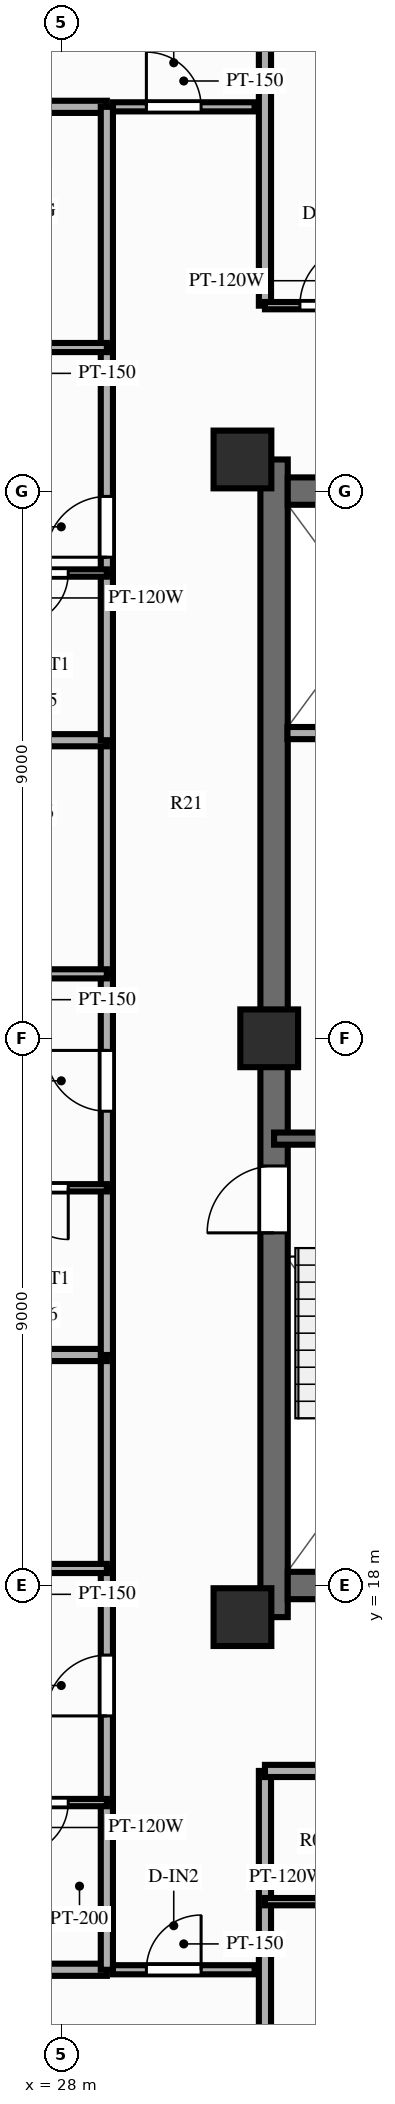
"""IFC4 building model, lengths in metres.
Left out: names, types, materials, properties, quantities, classifications, styles, units other than length and angle.
Written with IfcOpenShell. Run it as: python <this file> out.ifc"""

import sys

from ifc_helpers import new_model, si_unit, direction, frame, frame_2d, origin, origin_2d, place, context, subcontext, project, spatial, rectangle, extrude, source, transform, mapped, element, fill, save


model = new_model("IFC4")
c1 = context("Model", 3, precision=1e-05, world=origin(), true_north=direction((0.0, 1.0)))
c2 = subcontext(c1, "Body", "Model", "MODEL_VIEW")
j1 = project(units=[si_unit("LENGTHUNIT", "METRE"), si_unit("PLANEANGLEUNIT", "RADIAN")], contexts=[c1])
p1 = place(None, origin())
s1 = spatial("IfcSite", under=j1, at=p1, CompositionType="ELEMENT")
p2 = place(p1, origin())
s2 = spatial("IfcBuilding", under=s1, at=p2, CompositionType="ELEMENT")
p3 = place(p2, frame((0.0, 0.0, 226.2)))
s3 = spatial("IfcBuildingStorey", under=s2, at=p3, CompositionType="ELEMENT", Elevation=226.2)
p4 = place(p3, frame((31.5, 17.48, 0.0), z_axis=(0.0, 0.0, 1.0), x_axis=(0.0, 1.0, 0.0)))
e1 = element("IfcWall", 1, at=p4, inside=s3, PredefinedType="SHEAR", context=c2, shape_type="SweptSolid", body=[
    extrude(rectangle(XDim=19.04, YDim=0.45, at=frame_2d((9.52, 0.0))), origin(), (0.0, 0.0, 1.0), 3.9),
])
p5 = place(p4, frame((6.32, 0.0, 0.0)))
e2 = element("IfcOpeningElement", 2, at=p5, cuts=e1, PredefinedType="OPENING", context=c2, shape_type="SweptSolid", body=[
    extrude(rectangle(XDim=1.1, YDim=2.15, at=frame_2d((0.55, 1.075))), frame((0.0, 0.237, 0.0), z_axis=(0.0, -1.0, 0.0), x_axis=(1.0, 0.0, 0.0)), (0.0, 0.0, 1.0), 0.474),
])
p6 = place(p3, frame((31.725, 18.0, 0.0), z_axis=(0.0, 0.0, 1.0), x_axis=(1.0, 0.0, 0.0)))
e3 = element("IfcWall", 3, at=p6, inside=s3, PredefinedType="SHEAR", context=c2, shape_type="SweptSolid", body=[
    extrude(rectangle(XDim=12.55, YDim=0.45, at=frame_2d((6.275, 0.0))), origin(), (0.0, 0.0, 1.0), 3.9),
])
p7 = place(p3, frame((31.725, 36.0, 0.0), z_axis=(0.0, 0.0, 1.0), x_axis=(1.0, 0.0, 0.0)))
e4 = element("IfcWall", 4, at=p7, inside=s3, PredefinedType="SHEAR", context=c2, shape_type="SweptSolid", body=[
    extrude(rectangle(XDim=12.55, YDim=0.45, at=frame_2d((6.275, 0.0))), origin(), (0.0, 0.0, 1.0), 3.9),
])
p8 = place(p7, frame((5.225, 0.0, 0.0), z_axis=(0.0, 0.0, 1.0), x_axis=(-1.0, 0.0, 0.0)))
e5 = element("IfcOpeningElement", 5, at=p8, cuts=e4, PredefinedType="OPENING", context=c2, shape_type="SweptSolid", body=[
    extrude(rectangle(XDim=1.4, YDim=2.15, at=frame_2d((0.7, 1.075))), frame((0.0, 0.237, 0.0), z_axis=(0.0, -1.0, 0.0), x_axis=(1.0, 0.0, 0.0)), (0.0, 0.0, 1.0), 0.474),
])
m1 = source(origin(), c2, "Body", "SweptSolid", [
    extrude(rectangle(XDim=0.95, YDim=0.95, at=origin_2d()), origin(), (0.0, 0.0, 1.0), 3.9),
])
for number, where, z_axis, x_axis in (
    (6, (30.98, 17.48, 0.0), (0.0, 0.0, 1.0), (1.0, 0.0, 0.0)),
    (7, (30.98, 36.52, 0.0), (0.0, 0.0, 1.0), (1.0, 0.0, 0.0)),
    (8, (31.42, 27.0, 0.0), (0.0, 0.0, 1.0), (1.0, 0.0, 0.0)),
):
    element("IfcColumn", number, at=place(p3, frame(where, z_axis=z_axis, x_axis=x_axis)), inside=s3, PredefinedType="COLUMN", context=c2, shape_type="MappedRepresentation", body=[
        mapped(m1, transform((0.0, 0.0, 0.0), scale=1.0)),
    ])
p9 = place(p3, frame((31.5, 25.35, 0.0), z_axis=(0.0, 0.0, 1.0), x_axis=(1.0, 0.0, 0.0)))
e9 = element("IfcWall", 9, at=p9, inside=s3, PredefinedType="SOLIDWALL", context=c2, shape_type="SweptSolid", body=[
    extrude(rectangle(XDim=3.93, YDim=0.2, at=frame_2d((1.965, 0.0))), origin(), (0.0, 0.0, 1.0), 3.69),
])
p10 = place(p3, frame((31.72, 32.02, 0.0), z_axis=(0.0, 0.0, 1.0), x_axis=(1.0, 0.0, 0.0)))
e10 = element("IfcWall", 10, at=p10, inside=s3, PredefinedType="PARTITIONING", context=c2, shape_type="SweptSolid", body=[
    extrude(rectangle(XDim=2.8, YDim=0.2, at=frame_2d((1.4, 0.0))), origin(), (0.0, 0.0, 1.0), 3.69),
])
p11 = place(p3, frame((28.85, 11.68, 0.0), z_axis=(0.0, 0.0, 1.0), x_axis=(1.0, 0.0, 0.0)))
e11 = element("IfcWall", 11, at=p11, inside=s3, PredefinedType="PARTITIONING", context=c2, shape_type="SweptSolid", body=[
    extrude(rectangle(XDim=2.33, YDim=0.15, at=frame_2d((1.165, 0.0))), origin(), (0.0, 0.0, 1.0), 3.69),
])
p12 = place(p11, frame((0.55, 0.0, 0.0)))
e12 = element("IfcOpeningElement", 12, at=p12, cuts=e11, PredefinedType="OPENING", context=c2, shape_type="SweptSolid", body=[
    extrude(rectangle(XDim=0.9, YDim=2.1, at=frame_2d((0.45, 1.05))), frame((0.0, 0.087, 0.0), z_axis=(0.0, -1.0, 0.0), x_axis=(1.0, 0.0, 0.0)), (0.0, 0.0, 1.0), 0.174),
])
p13 = place(p3, frame((28.85, 42.32, 0.0), z_axis=(0.0, 0.0, 1.0), x_axis=(1.0, 0.0, 0.0)))
e13 = element("IfcWall", 13, at=p13, inside=s3, PredefinedType="PARTITIONING", context=c2, shape_type="SweptSolid", body=[
    extrude(rectangle(XDim=2.33, YDim=0.15, at=frame_2d((1.165, 0.0))), origin(), (0.0, 0.0, 1.0), 3.69),
])
p14 = place(p13, frame((0.55, 0.0, 0.0)))
e14 = element("IfcOpeningElement", 14, at=p14, cuts=e13, PredefinedType="OPENING", context=c2, shape_type="SweptSolid", body=[
    extrude(rectangle(XDim=0.9, YDim=2.1, at=frame_2d((0.45, 1.05))), frame((0.0, 0.087, 0.0), z_axis=(0.0, -1.0, 0.0), x_axis=(1.0, 0.0, 0.0)), (0.0, 0.0, 1.0), 0.174),
])
p15 = place(p3, frame((31.35, 14.95, 0.0), z_axis=(0.0, 0.0, 1.0), x_axis=(0.0, -1.0, 0.0)))
e15 = element("IfcWall", 15, at=p15, inside=s3, PredefinedType="PARTITIONING", context=c2, shape_type="SweptSolid", body=[
    extrude(rectangle(XDim=8.8, YDim=0.2, at=frame_2d((4.4, 0.0))), origin(), (0.0, 0.0, 1.0), 2.79),
])
p16 = place(p3, frame((31.35, 14.95, 0.0), z_axis=(0.0, 0.0, 1.0), x_axis=(1.0, 0.0, 0.0)))
e16 = element("IfcWall", 16, at=p16, inside=s3, PredefinedType="PARTITIONING", context=c2, shape_type="SweptSolid", body=[
    extrude(rectangle(XDim=2.85, YDim=0.2, at=frame_2d((1.425, 0.0))), origin(), (0.0, 0.0, 1.0), 3.69),
])
p17 = place(p3, frame((31.35, 12.8, 0.0), z_axis=(0.0, 0.0, 1.0), x_axis=(1.0, 0.0, 0.0)))
e17 = element("IfcWall", 17, at=p17, inside=s3, PredefinedType="PARTITIONING", context=c2, shape_type="SweptSolid", body=[
    extrude(rectangle(XDim=2.85, YDim=0.12, at=frame_2d((1.425, 0.0))), origin(), (0.0, 0.0, 1.0), 3.69),
])
p18 = place(p3, frame((31.35, 39.05, 0.0), z_axis=(0.0, 0.0, 1.0), x_axis=(0.0, 1.0, 0.0)))
e18 = element("IfcWall", 18, at=p18, inside=s3, PredefinedType="PARTITIONING", context=c2, shape_type="SweptSolid", body=[
    extrude(rectangle(XDim=8.8, YDim=0.2, at=frame_2d((4.4, 0.0))), origin(), (0.0, 0.0, 1.0), 2.79),
])
p19 = place(p3, frame((31.35, 39.05, 0.0), z_axis=(0.0, 0.0, 1.0), x_axis=(1.0, 0.0, 0.0)))
e19 = element("IfcWall", 19, at=p19, inside=s3, PredefinedType="PARTITIONING", context=c2, shape_type="SweptSolid", body=[
    extrude(rectangle(XDim=2.15, YDim=0.12, at=frame_2d((1.075, 0.0))), origin(), (0.0, 0.0, 1.0), 3.69),
])
p20 = place(p19, frame((0.575, 0.0, 0.0)))
e20 = element("IfcOpeningElement", 20, at=p20, cuts=e19, PredefinedType="OPENING", context=c2, shape_type="SweptSolid", body=[
    extrude(rectangle(XDim=1.0, YDim=2.1, at=frame_2d((0.5, 1.05))), frame((0.0, 0.072, 0.0), z_axis=(0.0, -1.0, 0.0), x_axis=(1.0, 0.0, 0.0)), (0.0, 0.0, 1.0), 0.144),
])
for number, where, z_axis, x_axis in (
    (21, (28.75, 11.68, 0.0), (0.0, 0.0, 1.0), (-1.0, 0.0, 0.0)),
    (22, (28.75, 42.32, 0.0), (0.0, 0.0, 1.0), (-1.0, 0.0, 0.0)),
):
    element("IfcWall", number, at=place(p3, frame(where, z_axis=z_axis, x_axis=x_axis)), inside=s3, PredefinedType="PARTITIONING", context=c2, shape_type="SweptSolid", body=[
        extrude(rectangle(XDim=7.35, YDim=0.2, at=frame_2d((3.675, 0.0))), origin(), (0.0, 0.0, 1.0), 3.69),
    ])
p21 = place(p3, frame((28.75, 11.68, 0.0), z_axis=(0.0, 0.0, 1.0), x_axis=(0.0, 1.0, 0.0)))
e23 = element("IfcWall", 23, at=p21, inside=s3, PredefinedType="PARTITIONING", context=c2, shape_type="SweptSolid", body=[
    extrude(rectangle(XDim=2.75, YDim=0.2, at=frame_2d((1.375, 0.0))), origin(), (0.0, 0.0, 1.0), 3.69),
])
p22 = place(p3, frame((28.75, 14.43, 0.0), z_axis=(0.0, 0.0, 1.0), x_axis=(0.0, 1.0, 0.0)))
e24 = element("IfcWall", 24, at=p22, inside=s3, PredefinedType="PARTITIONING", context=c2, shape_type="SweptSolid", body=[
    extrude(rectangle(XDim=3.85, YDim=0.2, at=frame_2d((1.925, 0.0))), origin(), (0.0, 0.0, 1.0), 3.69),
])
p23 = place(p22, frame((1.425, 0.0, 0.0)))
e25 = element("IfcOpeningElement", 25, at=p23, cuts=e24, PredefinedType="OPENING", context=c2, shape_type="SweptSolid", body=[
    extrude(rectangle(XDim=1.0, YDim=2.15, at=frame_2d((0.5, 1.075))), frame((0.0, 0.112, 0.0), z_axis=(0.0, -1.0, 0.0), x_axis=(1.0, 0.0, 0.0)), (0.0, 0.0, 1.0), 0.224),
])
p24 = place(p3, frame((28.75, 18.28, 0.0), z_axis=(0.0, 0.0, 1.0), x_axis=(0.0, 1.0, 0.0)))
e26 = element("IfcWall", 26, at=p24, inside=s3, PredefinedType="PARTITIONING", context=c2, shape_type="SweptSolid", body=[
    extrude(rectangle(XDim=3.511, YDim=0.2, at=frame_2d((1.756, 0.0))), origin(), (0.0, 0.0, 1.0), 3.69),
])
p25 = place(p3, frame((28.75, 14.43, 0.0), z_axis=(0.0, 0.0, 1.0), x_axis=(-1.0, 0.0, 0.0)))
e27 = element("IfcWall", 27, at=p25, inside=s3, PredefinedType="PARTITIONING", context=c2, shape_type="SweptSolid", body=[
    extrude(rectangle(XDim=2.12, YDim=0.12, at=frame_2d((1.06, 0.0))), origin(), (0.0, 0.0, 1.0), 3.69),
])
p26 = place(p25, frame((0.635, 0.0, 0.0)))
e28 = element("IfcOpeningElement", 28, at=p26, cuts=e27, PredefinedType="OPENING", context=c2, shape_type="SweptSolid", body=[
    extrude(rectangle(XDim=0.85, YDim=2.05, at=frame_2d((0.425, 1.025))), frame((0.0, 0.072, 0.0), z_axis=(0.0, -1.0, 0.0), x_axis=(1.0, 0.0, 0.0)), (0.0, 0.0, 1.0), 0.144),
])
p27 = place(p3, frame((28.75, 18.28, 0.0), z_axis=(0.0, 0.0, 1.0), x_axis=(-1.0, 0.0, 0.0)))
e29 = element("IfcWall", 29, at=p27, inside=s3, PredefinedType="PARTITIONING", context=c2, shape_type="SweptSolid", body=[
    extrude(rectangle(XDim=3.08, YDim=0.15, at=frame_2d((1.54, 0.0))), origin(), (0.0, 0.0, 1.0), 3.69),
])
p28 = place(p27, frame((1.09, 0.0, 0.0)))
e30 = element("IfcOpeningElement", 30, at=p28, cuts=e29, PredefinedType="OPENING", context=c2, shape_type="SweptSolid", body=[
    extrude(rectangle(XDim=0.9, YDim=2.1, at=frame_2d((0.45, 1.05))), frame((0.0, 0.087, 0.0), z_axis=(0.0, -1.0, 0.0), x_axis=(1.0, 0.0, 0.0)), (0.0, 0.0, 1.0), 0.174),
])
p29 = place(p3, frame((28.75, 21.791, 0.0), z_axis=(0.0, 0.0, 1.0), x_axis=(-1.0, 0.0, 0.0)))
e31 = element("IfcWall", 31, at=p29, inside=s3, PredefinedType="PARTITIONING", context=c2, shape_type="SweptSolid", body=[
    extrude(rectangle(XDim=7.35, YDim=0.2, at=frame_2d((3.675, 0.0))), origin(), (0.0, 0.0, 1.0), 3.29),
])
p30 = place(p3, frame((28.75, 21.791, 0.0), z_axis=(0.0, 0.0, 1.0), x_axis=(0.0, 1.0, 0.0)))
e32 = element("IfcWall", 32, at=p30, inside=s3, PredefinedType="PARTITIONING", context=c2, shape_type="SweptSolid", body=[
    extrude(rectangle(XDim=2.75, YDim=0.2, at=frame_2d((1.375, 0.0))), origin(), (0.0, 0.0, 1.0), 3.69),
])
p31 = place(p3, frame((28.75, 24.541, 0.0), z_axis=(0.0, 0.0, 1.0), x_axis=(0.0, 1.0, 0.0)))
e33 = element("IfcWall", 33, at=p31, inside=s3, PredefinedType="PARTITIONING", context=c2, shape_type="SweptSolid", body=[
    extrude(rectangle(XDim=3.519, YDim=0.2, at=frame_2d((1.759, 0.0))), origin(), (0.0, 0.0, 1.0), 3.69),
])
p32 = place(p31, frame((1.26, 0.0, 0.0)))
e34 = element("IfcOpeningElement", 34, at=p32, cuts=e33, PredefinedType="OPENING", context=c2, shape_type="SweptSolid", body=[
    extrude(rectangle(XDim=1.0, YDim=2.15, at=frame_2d((0.5, 1.075))), frame((0.0, 0.112, 0.0), z_axis=(0.0, -1.0, 0.0), x_axis=(1.0, 0.0, 0.0)), (0.0, 0.0, 1.0), 0.224),
])
p33 = place(p3, frame((28.75, 28.06, 0.0), z_axis=(0.0, 0.0, 1.0), x_axis=(0.0, 1.0, 0.0)))
e35 = element("IfcWall", 35, at=p33, inside=s3, PredefinedType="PARTITIONING", context=c2, shape_type="SweptSolid", body=[
    extrude(rectangle(XDim=3.842, YDim=0.2, at=frame_2d((1.921, 0.0))), origin(), (0.0, 0.0, 1.0), 3.69),
])
p34 = place(p3, frame((28.75, 24.541, 0.0), z_axis=(0.0, 0.0, 1.0), x_axis=(-1.0, 0.0, 0.0)))
e36 = element("IfcWall", 36, at=p34, inside=s3, PredefinedType="PARTITIONING", context=c2, shape_type="SweptSolid", body=[
    extrude(rectangle(XDim=2.12, YDim=0.12, at=frame_2d((1.06, 0.0))), origin(), (0.0, 0.0, 1.0), 3.69),
])
p35 = place(p34, frame((0.635, 0.0, 0.0)))
e37 = element("IfcOpeningElement", 37, at=p35, cuts=e36, PredefinedType="OPENING", context=c2, shape_type="SweptSolid", body=[
    extrude(rectangle(XDim=0.85, YDim=2.05, at=frame_2d((0.425, 1.025))), frame((0.0, 0.072, 0.0), z_axis=(0.0, -1.0, 0.0), x_axis=(1.0, 0.0, 0.0)), (0.0, 0.0, 1.0), 0.144),
])
p36 = place(p3, frame((28.75, 28.06, 0.0), z_axis=(0.0, 0.0, 1.0), x_axis=(-1.0, 0.0, 0.0)))
e38 = element("IfcWall", 38, at=p36, inside=s3, PredefinedType="PARTITIONING", context=c2, shape_type="SweptSolid", body=[
    extrude(rectangle(XDim=3.08, YDim=0.15, at=frame_2d((1.54, 0.0))), origin(), (0.0, 0.0, 1.0), 3.69),
])
p37 = place(p36, frame((1.09, 0.0, 0.0)))
e39 = element("IfcOpeningElement", 39, at=p37, cuts=e38, PredefinedType="OPENING", context=c2, shape_type="SweptSolid", body=[
    extrude(rectangle(XDim=0.9, YDim=2.1, at=frame_2d((0.45, 1.05))), frame((0.0, 0.087, 0.0), z_axis=(0.0, -1.0, 0.0), x_axis=(1.0, 0.0, 0.0)), (0.0, 0.0, 1.0), 0.174),
])
p38 = place(p3, frame((28.75, 31.902, 0.0), z_axis=(0.0, 0.0, 1.0), x_axis=(-1.0, 0.0, 0.0)))
e40 = element("IfcWall", 40, at=p38, inside=s3, PredefinedType="PARTITIONING", context=c2, shape_type="SweptSolid", body=[
    extrude(rectangle(XDim=7.35, YDim=0.2, at=frame_2d((3.675, 0.0))), origin(), (0.0, 0.0, 1.0), 3.29),
])
p39 = place(p3, frame((28.75, 31.902, 0.0), z_axis=(0.0, 0.0, 1.0), x_axis=(0.0, 1.0, 0.0)))
e41 = element("IfcWall", 41, at=p39, inside=s3, PredefinedType="PARTITIONING", context=c2, shape_type="SweptSolid", body=[
    extrude(rectangle(XDim=2.75, YDim=0.2, at=frame_2d((1.375, 0.0))), origin(), (0.0, 0.0, 1.0), 3.69),
])
p40 = place(p3, frame((28.75, 34.652, 0.0), z_axis=(0.0, 0.0, 1.0), x_axis=(0.0, 1.0, 0.0)))
e42 = element("IfcWall", 42, at=p40, inside=s3, PredefinedType="PARTITIONING", context=c2, shape_type="SweptSolid", body=[
    extrude(rectangle(XDim=3.709, YDim=0.2, at=frame_2d((1.854, 0.0))), origin(), (0.0, 0.0, 1.0), 3.69),
])
p41 = place(p40, frame((0.26, 0.0, 0.0)))
e43 = element("IfcOpeningElement", 43, at=p41, cuts=e42, PredefinedType="OPENING", context=c2, shape_type="SweptSolid", body=[
    extrude(rectangle(XDim=1.0, YDim=2.15, at=frame_2d((0.5, 1.075))), frame((0.0, 0.112, 0.0), z_axis=(0.0, -1.0, 0.0), x_axis=(1.0, 0.0, 0.0)), (0.0, 0.0, 1.0), 0.224),
])
p42 = place(p3, frame((28.75, 38.361, 0.0), z_axis=(0.0, 0.0, 1.0), x_axis=(0.0, 1.0, 0.0)))
e44 = element("IfcWall", 44, at=p42, inside=s3, PredefinedType="PARTITIONING", context=c2, shape_type="SweptSolid", body=[
    extrude(rectangle(XDim=3.959, YDim=0.2, at=frame_2d((1.979, 0.0))), origin(), (0.0, 0.0, 1.0), 3.69),
])
p43 = place(p3, frame((28.75, 34.652, 0.0), z_axis=(0.0, 0.0, 1.0), x_axis=(-1.0, 0.0, 0.0)))
e45 = element("IfcWall", 45, at=p43, inside=s3, PredefinedType="PARTITIONING", context=c2, shape_type="SweptSolid", body=[
    extrude(rectangle(XDim=2.12, YDim=0.12, at=frame_2d((1.06, 0.0))), origin(), (0.0, 0.0, 1.0), 3.69),
])
p44 = place(p43, frame((0.635, 0.0, 0.0)))
e46 = element("IfcOpeningElement", 46, at=p44, cuts=e45, PredefinedType="OPENING", context=c2, shape_type="SweptSolid", body=[
    extrude(rectangle(XDim=0.85, YDim=2.05, at=frame_2d((0.425, 1.025))), frame((0.0, 0.072, 0.0), z_axis=(0.0, -1.0, 0.0), x_axis=(1.0, 0.0, 0.0)), (0.0, 0.0, 1.0), 0.144),
])
p45 = place(p3, frame((28.75, 38.361, 0.0), z_axis=(0.0, 0.0, 1.0), x_axis=(-1.0, 0.0, 0.0)))
e47 = element("IfcWall", 47, at=p45, inside=s3, PredefinedType="PARTITIONING", context=c2, shape_type="SweptSolid", body=[
    extrude(rectangle(XDim=3.08, YDim=0.15, at=frame_2d((1.54, 0.0))), origin(), (0.0, 0.0, 1.0), 3.69),
])
p46 = place(p45, frame((1.09, 0.0, 0.0)))
e48 = element("IfcOpeningElement", 48, at=p46, cuts=e47, PredefinedType="OPENING", context=c2, shape_type="SweptSolid", body=[
    extrude(rectangle(XDim=0.9, YDim=2.1, at=frame_2d((0.45, 1.05))), frame((0.0, 0.087, 0.0), z_axis=(0.0, -1.0, 0.0), x_axis=(1.0, 0.0, 0.0)), (0.0, 0.0, 1.0), 0.174),
])
m2 = source(origin(), c2, "Body", "SweptSolid", [
    extrude(rectangle(XDim=1.1, YDim=2.15, at=frame_2d((0.55, 1.075))), frame((0.0, 0.025, 0.0), z_axis=(0.0, -1.0, 0.0), x_axis=(1.0, 0.0, 0.0)), (0.0, 0.0, 1.0), 0.05),
])
p47 = place(p5, origin())
e49 = element("IfcDoor", 49, at=p47, inside=s3, OperationType="SINGLE_SWING_LEFT", PredefinedType="DOOR", context=c2, shape_type="MappedRepresentation", body=[
    mapped(m2, transform((0.0, 0.0, 0.0), scale=1.0)),
])
fill(e2, e49)
m3 = source(origin(), c2, "Body", "SweptSolid", [
    extrude(rectangle(XDim=0.9, YDim=2.1, at=frame_2d((0.45, 1.05))), frame((0.0, 0.025, 0.0), z_axis=(0.0, -1.0, 0.0), x_axis=(1.0, 0.0, 0.0)), (0.0, 0.0, 1.0), 0.05),
])
p48 = place(p12, origin())
e50 = element("IfcDoor", 50, at=p48, inside=s3, OperationType="SINGLE_SWING_RIGHT", PredefinedType="DOOR", context=c2, shape_type="MappedRepresentation", body=[
    mapped(m3, transform((0.0, 0.0, 0.0), scale=1.0)),
])
fill(e12, e50)
p49 = place(p14, origin())
e51 = element("IfcDoor", 51, at=p49, inside=s3, OperationType="SINGLE_SWING_LEFT", PredefinedType="DOOR", context=c2, shape_type="MappedRepresentation", body=[
    mapped(m3, transform((0.0, 0.0, 0.0), scale=1.0)),
])
fill(e14, e51)
m4 = source(origin(), c2, "Body", "SweptSolid", [
    extrude(rectangle(XDim=1.0, YDim=2.1, at=frame_2d((0.5, 1.05))), frame((0.0, 0.025, 0.0), z_axis=(0.0, -1.0, 0.0), x_axis=(1.0, 0.0, 0.0)), (0.0, 0.0, 1.0), 0.05),
])
p50 = place(p20, origin())
e52 = element("IfcDoor", 52, at=p50, inside=s3, OperationType="SINGLE_SWING_RIGHT", PredefinedType="DOOR", context=c2, shape_type="MappedRepresentation", body=[
    mapped(m4, transform((0.0, 0.0, 0.0), scale=1.0)),
])
fill(e20, e52)
m5 = source(origin(), c2, "Body", "SweptSolid", [
    extrude(rectangle(XDim=1.0, YDim=2.15, at=frame_2d((0.5, 1.075))), frame((0.0, 0.025, 0.0), z_axis=(0.0, -1.0, 0.0), x_axis=(1.0, 0.0, 0.0)), (0.0, 0.0, 1.0), 0.05),
])
p51 = place(p23, origin())
e53 = element("IfcDoor", 53, at=p51, inside=s3, OperationType="SINGLE_SWING_LEFT", PredefinedType="DOOR", context=c2, shape_type="MappedRepresentation", body=[
    mapped(m5, transform((0.0, 0.0, 0.0), scale=1.0)),
])
fill(e25, e53)
m6 = source(origin(), c2, "Body", "SweptSolid", [
    extrude(rectangle(XDim=0.85, YDim=2.05, at=frame_2d((0.425, 1.025))), frame((0.0, 0.025, 0.0), z_axis=(0.0, -1.0, 0.0), x_axis=(1.0, 0.0, 0.0)), (0.0, 0.0, 1.0), 0.05),
])
p52 = place(p26, origin())
e54 = element("IfcDoor", 54, at=p52, inside=s3, OperationType="SINGLE_SWING_RIGHT", PredefinedType="DOOR", context=c2, shape_type="MappedRepresentation", body=[
    mapped(m6, transform((0.0, 0.0, 0.0), scale=1.0)),
])
fill(e28, e54)
p53 = place(p32, origin())
e55 = element("IfcDoor", 55, at=p53, inside=s3, OperationType="SINGLE_SWING_RIGHT", PredefinedType="DOOR", context=c2, shape_type="MappedRepresentation", body=[
    mapped(m5, transform((0.0, 0.0, 0.0), scale=1.0)),
])
fill(e34, e55)
p54 = place(p35, origin())
e56 = element("IfcDoor", 56, at=p54, inside=s3, OperationType="SINGLE_SWING_LEFT", PredefinedType="DOOR", context=c2, shape_type="MappedRepresentation", body=[
    mapped(m6, transform((0.0, 0.0, 0.0), scale=1.0)),
])
fill(e37, e56)
p55 = place(p41, origin())
e57 = element("IfcDoor", 57, at=p55, inside=s3, OperationType="SINGLE_SWING_LEFT", PredefinedType="DOOR", context=c2, shape_type="MappedRepresentation", body=[
    mapped(m5, transform((0.0, 0.0, 0.0), scale=1.0)),
])
fill(e43, e57)
p56 = place(p44, origin())
e58 = element("IfcDoor", 58, at=p56, inside=s3, OperationType="SINGLE_SWING_RIGHT", PredefinedType="DOOR", context=c2, shape_type="MappedRepresentation", body=[
    mapped(m6, transform((0.0, 0.0, 0.0), scale=1.0)),
])
fill(e46, e58)
save(model, sys.argv[1])
